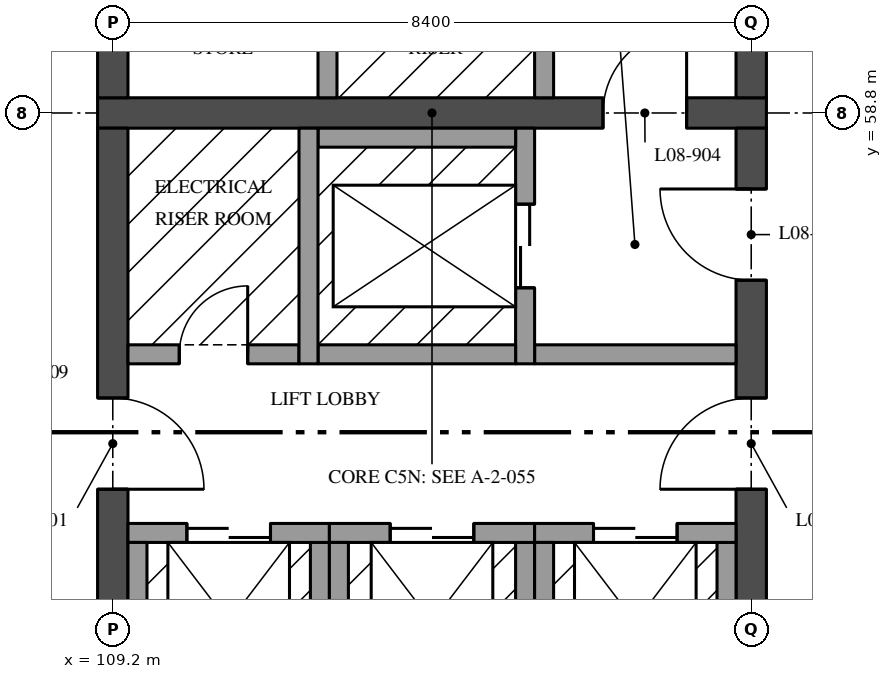
"""IFC4 building model, lengths in metres.
Left out: names, types, materials, properties, quantities, classifications, styles, units other than length and angle.
Written with IfcOpenShell. Run it as: python <this file> out.ifc"""

import sys

from ifc_helpers import new_model, si_unit, direction, frame, frame_2d, origin, place, context, subcontext, project, spatial, rectangle, extrude, element, fill, save


model = new_model("IFC4")
c1 = context("Model", 3, precision=1e-05, world=origin(), true_north=direction((0.0, 1.0)))
c2 = subcontext(c1, "Body", "Model", "MODEL_VIEW")
j1 = project(units=[si_unit("LENGTHUNIT", "METRE"), si_unit("PLANEANGLEUNIT", "RADIAN")], contexts=[c1])
p1 = place(None, origin())
s1 = spatial("IfcSite", under=j1, at=p1, CompositionType="ELEMENT")
p2 = place(p1, origin())
s2 = spatial("IfcBuilding", under=s1, at=p2, CompositionType="ELEMENT")
p3 = place(p2, frame((0.0, 0.0, 36.9)))
s3 = spatial("IfcBuildingStorey", under=s2, at=p3, CompositionType="ELEMENT", Elevation=36.9)
p4 = place(p3, frame((109.0, 58.8, 0.0), z_axis=(0.0, 0.0, 1.0), x_axis=(1.0, 0.0, 0.0)))
e1 = element("IfcWall", 1, at=p4, inside=s3, PredefinedType="SHEAR", context=c2, shape_type="SweptSolid", body=[
    extrude(rectangle(XDim=8.8, YDim=0.4, at=frame_2d((4.4, 0.0))), origin(), (0.0, 0.0, 1.0), 4.37),
])
p5 = place(p4, frame((6.65, 0.0, 0.0)))
e2 = element("IfcOpeningElement", 2, at=p5, cuts=e1, PredefinedType="OPENING", context=c2, shape_type="SweptSolid", body=[
    extrude(rectangle(XDim=1.1, YDim=2.1, at=frame_2d((0.55, 1.05))), frame((0.0, 0.21, 0.0), z_axis=(0.0, -1.0, 0.0), x_axis=(1.0, 0.0, 0.0)), (0.0, 0.0, 1.0), 0.42),
])
p6 = place(p3, frame((109.2, 50.6, 0.0), z_axis=(0.0, 0.0, 1.0), x_axis=(0.0, 1.0, 0.0)))
e3 = element("IfcWall", 3, at=p6, inside=s3, PredefinedType="SHEAR", context=c2, shape_type="SweptSolid", body=[
    extrude(rectangle(XDim=8.0, YDim=0.4, at=frame_2d((4.0, 0.0))), origin(), (0.0, 0.0, 1.0), 4.37),
])
p7 = place(p6, frame((3.25, 0.0, 0.0)))
e4 = element("IfcOpeningElement", 4, at=p7, cuts=e3, PredefinedType="OPENING", context=c2, shape_type="SweptSolid", body=[
    extrude(rectangle(XDim=1.2, YDim=2.1, at=frame_2d((0.6, 1.05))), frame((0.0, 0.21, 0.0), z_axis=(0.0, -1.0, 0.0), x_axis=(1.0, 0.0, 0.0)), (0.0, 0.0, 1.0), 0.42),
])
p8 = place(p3, frame((117.6, 50.6, 0.0), z_axis=(0.0, 0.0, 1.0), x_axis=(0.0, 1.0, 0.0)))
e5 = element("IfcWall", 5, at=p8, inside=s3, PredefinedType="SHEAR", context=c2, shape_type="SweptSolid", body=[
    extrude(rectangle(XDim=8.0, YDim=0.4, at=frame_2d((4.0, 0.0))), origin(), (0.0, 0.0, 1.0), 4.37),
])
p9 = place(p8, frame((3.25, 0.0, 0.0)))
e6 = element("IfcOpeningElement", 6, at=p9, cuts=e5, PredefinedType="OPENING", context=c2, shape_type="SweptSolid", body=[
    extrude(rectangle(XDim=1.2, YDim=2.1, at=frame_2d((0.6, 1.05))), frame((0.0, 0.21, 0.0), z_axis=(0.0, -1.0, 0.0), x_axis=(1.0, 0.0, 0.0)), (0.0, 0.0, 1.0), 0.42),
])
p10 = place(p8, frame((6.0, 0.0, 0.0)))
e7 = element("IfcOpeningElement", 7, at=p10, cuts=e5, PredefinedType="OPENING", context=c2, shape_type="SweptSolid", body=[
    extrude(rectangle(XDim=1.2, YDim=2.1, at=frame_2d((0.6, 1.05))), frame((0.0, 0.21, 0.0), z_axis=(0.0, -1.0, 0.0), x_axis=(1.0, 0.0, 0.0)), (0.0, 0.0, 1.0), 0.42),
])
p11 = place(p3, frame((109.4, 55.625, 0.0), z_axis=(0.0, 0.0, 1.0), x_axis=(1.0, 0.0, 0.0)))
e8 = element("IfcWall", 8, at=p11, inside=s3, PredefinedType="SOLIDWALL", context=c2, shape_type="SweptSolid", body=[
    extrude(rectangle(XDim=2.25, YDim=0.25, at=frame_2d((1.125, 0.0))), origin(), (0.0, 0.0, 1.0), 4.37),
])
p12 = place(p11, frame((0.675, 0.0, 0.0)))
e9 = element("IfcOpeningElement", 9, at=p12, cuts=e8, PredefinedType="OPENING", context=c2, shape_type="SweptSolid", body=[
    extrude(rectangle(XDim=0.9, YDim=2.1, at=frame_2d((0.45, 1.05))), frame((0.0, 0.135, 0.0), z_axis=(0.0, -1.0, 0.0), x_axis=(1.0, 0.0, 0.0)), (0.0, 0.0, 1.0), 0.27),
])
p13 = place(p3, frame((114.75, 55.625, 0.0), z_axis=(0.0, 0.0, 1.0), x_axis=(1.0, 0.0, 0.0)))
e10 = element("IfcWall", 10, at=p13, inside=s3, PredefinedType="SOLIDWALL", context=c2, shape_type="SweptSolid", body=[
    extrude(rectangle(XDim=2.65, YDim=0.25, at=frame_2d((1.325, 0.0))), origin(), (0.0, 0.0, 1.0), 4.37),
])
p14 = place(p3, frame((109.2, 59.0, 0.0), z_axis=(0.0, 0.0, 1.0), x_axis=(0.0, 1.0, 0.0)))
e11 = element("IfcWall", 11, at=p14, inside=s3, PredefinedType="SHEAR", context=c2, shape_type="SweptSolid", body=[
    extrude(rectangle(XDim=8.0, YDim=0.4, at=frame_2d((4.0, 0.0))), origin(), (0.0, 0.0, 1.0), 4.37),
])
p15 = place(p14, frame((2.925, 0.0, 0.0)))
e12 = element("IfcOpeningElement", 12, at=p15, cuts=e11, PredefinedType="OPENING", context=c2, shape_type="SweptSolid", body=[
    extrude(rectangle(XDim=1.2, YDim=2.1, at=frame_2d((0.6, 1.05))), frame((0.0, 0.21, 0.0), z_axis=(0.0, -1.0, 0.0), x_axis=(1.0, 0.0, 0.0)), (0.0, 0.0, 1.0), 0.42),
])
p16 = place(p3, frame((117.6, 59.0, 0.0), z_axis=(0.0, 0.0, 1.0), x_axis=(0.0, 1.0, 0.0)))
e13 = element("IfcWall", 13, at=p16, inside=s3, PredefinedType="SHEAR", context=c2, shape_type="SweptSolid", body=[
    extrude(rectangle(XDim=8.0, YDim=0.4, at=frame_2d((4.0, 0.0))), origin(), (0.0, 0.0, 1.0), 4.37),
])
p17 = place(p16, frame((2.925, 0.0, 0.0)))
e14 = element("IfcOpeningElement", 14, at=p17, cuts=e13, PredefinedType="OPENING", context=c2, shape_type="SweptSolid", body=[
    extrude(rectangle(XDim=1.2, YDim=2.1, at=frame_2d((0.6, 1.05))), frame((0.0, 0.21, 0.0), z_axis=(0.0, -1.0, 0.0), x_axis=(1.0, 0.0, 0.0)), (0.0, 0.0, 1.0), 0.42),
])
p18 = place(p3, frame((114.875, 61.8, 0.0), z_axis=(0.0, 0.0, 1.0), x_axis=(0.0, -1.0, 0.0)))
e15 = element("IfcWall", 15, at=p18, inside=s3, PredefinedType="SOLIDWALL", context=c2, shape_type="SweptSolid", body=[
    extrude(rectangle(XDim=2.8, YDim=0.25, at=frame_2d((1.4, 0.0))), origin(), (0.0, 0.0, 1.0), 4.37),
])
p19 = place(p3, frame((112.025, 61.55, 0.0), z_axis=(0.0, 0.0, 1.0), x_axis=(0.0, -1.0, 0.0)))
e16 = element("IfcWall", 16, at=p19, inside=s3, PredefinedType="SOLIDWALL", context=c2, shape_type="SweptSolid", body=[
    extrude(rectangle(XDim=2.55, YDim=0.25, at=frame_2d((1.275, 0.0))), origin(), (0.0, 0.0, 1.0), 4.37),
])
p20 = place(p3, frame((114.625, 55.5, 0.0), z_axis=(0.0, 0.0, 1.0), x_axis=(0.0, 1.0, 0.0)))
e17 = element("IfcWall", 17, at=p20, inside=s3, PredefinedType="SOLIDWALL", context=c2, shape_type="SweptSolid", body=[
    extrude(rectangle(XDim=3.1, YDim=0.25, at=frame_2d((1.55, 0.0))), origin(), (0.0, 0.0, 1.0), 4.37),
])
p21 = place(p20, frame((1.0, 0.0, 0.0)))
e18 = element("IfcOpeningElement", 18, at=p21, cuts=e17, PredefinedType="OPENING", context=c2, shape_type="SweptSolid", body=[
    extrude(rectangle(XDim=1.1, YDim=2.1, at=frame_2d((0.55, 1.05))), frame((0.0, 0.135, 0.0), z_axis=(0.0, -1.0, 0.0), x_axis=(1.0, 0.0, 0.0)), (0.0, 0.0, 1.0), 0.27),
])
for number, where, z_axis, x_axis in (
    (19, (111.9, 58.475, 0.0), (0.0, 0.0, 1.0), (1.0, 0.0, 0.0)),
    (20, (111.9, 55.625, 0.0), (0.0, 0.0, 1.0), (1.0, 0.0, 0.0)),
):
    element("IfcWall", number, at=place(p3, frame(where, z_axis=z_axis, x_axis=x_axis)), inside=s3, PredefinedType="SOLIDWALL", context=c2, shape_type="SweptSolid", body=[
        extrude(rectangle(XDim=2.6, YDim=0.25, at=frame_2d((1.3, 0.0))), origin(), (0.0, 0.0, 1.0), 4.37),
    ])
p22 = place(p3, frame((111.775, 55.5, 0.0), z_axis=(0.0, 0.0, 1.0), x_axis=(0.0, 1.0, 0.0)))
e21 = element("IfcWall", 21, at=p22, inside=s3, PredefinedType="SOLIDWALL", context=c2, shape_type="SweptSolid", body=[
    extrude(rectangle(XDim=3.1, YDim=0.25, at=frame_2d((1.55, 0.0))), origin(), (0.0, 0.0, 1.0), 4.37),
])
p23 = place(p3, frame((111.925, 50.85, 0.0), z_axis=(0.0, 0.0, 1.0), x_axis=(0.0, 1.0, 0.0)))
e22 = element("IfcWall", 22, at=p23, inside=s3, PredefinedType="SOLIDWALL", context=c2, shape_type="SweptSolid", body=[
    extrude(rectangle(XDim=2.3, YDim=0.25, at=frame_2d((1.15, 0.0))), origin(), (0.0, 0.0, 1.0), 4.37),
])
p24 = place(p3, frame((109.4, 53.275, 0.0), z_axis=(0.0, 0.0, 1.0), x_axis=(1.0, 0.0, 0.0)))
e23 = element("IfcWall", 23, at=p24, inside=s3, PredefinedType="SOLIDWALL", context=c2, shape_type="SweptSolid", body=[
    extrude(rectangle(XDim=2.65, YDim=0.25, at=frame_2d((1.325, 0.0))), origin(), (0.0, 0.0, 1.0), 4.37),
])
p25 = place(p24, frame((0.775, 0.0, 0.0)))
e24 = element("IfcOpeningElement", 24, at=p25, cuts=e23, PredefinedType="OPENING", context=c2, shape_type="SweptSolid", body=[
    extrude(rectangle(XDim=1.1, YDim=2.1, at=frame_2d((0.55, 1.05))), frame((0.0, 0.135, 0.0), z_axis=(0.0, -1.0, 0.0), x_axis=(1.0, 0.0, 0.0)), (0.0, 0.0, 1.0), 0.27),
])
for number, where, z_axis, x_axis in (
    (25, (109.525, 50.85, 0.0), (0.0, 0.0, 1.0), (0.0, 1.0, 0.0)),
    (26, (114.625, 50.85, 0.0), (0.0, 0.0, 1.0), (0.0, 1.0, 0.0)),
):
    element("IfcWall", number, at=place(p3, frame(where, z_axis=z_axis, x_axis=x_axis)), inside=s3, PredefinedType="SOLIDWALL", context=c2, shape_type="SweptSolid", body=[
        extrude(rectangle(XDim=2.3, YDim=0.25, at=frame_2d((1.15, 0.0))), origin(), (0.0, 0.0, 1.0), 4.37),
    ])
p26 = place(p3, frame((112.05, 53.275, 0.0), z_axis=(0.0, 0.0, 1.0), x_axis=(1.0, 0.0, 0.0)))
e27 = element("IfcWall", 27, at=p26, inside=s3, PredefinedType="SOLIDWALL", context=c2, shape_type="SweptSolid", body=[
    extrude(rectangle(XDim=2.7, YDim=0.25, at=frame_2d((1.35, 0.0))), origin(), (0.0, 0.0, 1.0), 4.37),
])
p27 = place(p26, frame((0.8, 0.0, 0.0)))
e28 = element("IfcOpeningElement", 28, at=p27, cuts=e27, PredefinedType="OPENING", context=c2, shape_type="SweptSolid", body=[
    extrude(rectangle(XDim=1.1, YDim=2.1, at=frame_2d((0.55, 1.05))), frame((0.0, 0.135, 0.0), z_axis=(0.0, -1.0, 0.0), x_axis=(1.0, 0.0, 0.0)), (0.0, 0.0, 1.0), 0.27),
])
for number, where, z_axis, x_axis in (
    (29, (112.175, 50.85, 0.0), (0.0, 0.0, 1.0), (0.0, 1.0, 0.0)),
    (30, (117.275, 50.85, 0.0), (0.0, 0.0, 1.0), (0.0, 1.0, 0.0)),
):
    element("IfcWall", number, at=place(p3, frame(where, z_axis=z_axis, x_axis=x_axis)), inside=s3, PredefinedType="SOLIDWALL", context=c2, shape_type="SweptSolid", body=[
        extrude(rectangle(XDim=2.3, YDim=0.25, at=frame_2d((1.15, 0.0))), origin(), (0.0, 0.0, 1.0), 4.37),
    ])
p28 = place(p3, frame((114.75, 53.275, 0.0), z_axis=(0.0, 0.0, 1.0), x_axis=(1.0, 0.0, 0.0)))
e31 = element("IfcWall", 31, at=p28, inside=s3, PredefinedType="SOLIDWALL", context=c2, shape_type="SweptSolid", body=[
    extrude(rectangle(XDim=2.65, YDim=0.25, at=frame_2d((1.325, 0.0))), origin(), (0.0, 0.0, 1.0), 4.37),
])
p29 = place(p28, frame((0.775, 0.0, 0.0)))
e32 = element("IfcOpeningElement", 32, at=p29, cuts=e31, PredefinedType="OPENING", context=c2, shape_type="SweptSolid", body=[
    extrude(rectangle(XDim=1.1, YDim=2.1, at=frame_2d((0.55, 1.05))), frame((0.0, 0.135, 0.0), z_axis=(0.0, -1.0, 0.0), x_axis=(1.0, 0.0, 0.0)), (0.0, 0.0, 1.0), 0.27),
])
p30 = place(p3, frame((114.875, 50.85, 0.0), z_axis=(0.0, 0.0, 1.0), x_axis=(0.0, 1.0, 0.0)))
e33 = element("IfcWall", 33, at=p30, inside=s3, PredefinedType="SOLIDWALL", context=c2, shape_type="SweptSolid", body=[
    extrude(rectangle(XDim=2.3, YDim=0.25, at=frame_2d((1.15, 0.0))), origin(), (0.0, 0.0, 1.0), 4.37),
])
p31 = place(p7, frame((1.2, 0.0, 0.0), z_axis=(0.0, 0.0, 1.0), x_axis=(-1.0, 0.0, 0.0)))
e34 = element("IfcDoor", 34, at=p31, inside=s3, OperationType="SINGLE_SWING_LEFT", PredefinedType="DOOR", context=c2, shape_type="SweptSolid", body=[
    extrude(rectangle(XDim=1.2, YDim=2.1, at=frame_2d((0.6, 1.05))), frame((0.0, 0.035, 0.0), z_axis=(0.0, -1.0, 0.0), x_axis=(1.0, 0.0, 0.0)), (0.0, 0.0, 1.0), 0.07),
])
fill(e4, e34)
p32 = place(p9, origin())
e35 = element("IfcDoor", 35, at=p32, inside=s3, OperationType="SINGLE_SWING_RIGHT", PredefinedType="DOOR", context=c2, shape_type="SweptSolid", body=[
    extrude(rectangle(XDim=1.2, YDim=2.1, at=frame_2d((0.6, 1.05))), frame((0.0, 0.035, 0.0), z_axis=(0.0, -1.0, 0.0), x_axis=(1.0, 0.0, 0.0)), (0.0, 0.0, 1.0), 0.07),
])
fill(e6, e35)
p33 = place(p10, origin())
e36 = element("IfcDoor", 36, at=p33, inside=s3, OperationType="SINGLE_SWING_LEFT", PredefinedType="DOOR", context=c2, shape_type="SweptSolid", body=[
    extrude(rectangle(XDim=1.2, YDim=2.1, at=frame_2d((0.6, 1.05))), frame((0.0, 0.035, 0.0), z_axis=(0.0, -1.0, 0.0), x_axis=(1.0, 0.0, 0.0)), (0.0, 0.0, 1.0), 0.07),
])
fill(e7, e36)
p34 = place(p5, origin())
e37 = element("IfcDoor", 37, at=p34, inside=s3, OperationType="SINGLE_SWING_LEFT", PredefinedType="DOOR", context=c2, shape_type="SweptSolid", body=[
    extrude(rectangle(XDim=1.1, YDim=2.1, at=frame_2d((0.55, 1.05))), frame((0.0, 0.035, 0.0), z_axis=(0.0, -1.0, 0.0), x_axis=(1.0, 0.0, 0.0)), (0.0, 0.0, 1.0), 0.07),
])
fill(e2, e37)
p35 = place(p12, origin())
e38 = element("IfcDoor", 38, at=p35, inside=s3, OperationType="SINGLE_SWING_LEFT", PredefinedType="DOOR", context=c2, shape_type="SweptSolid", body=[
    extrude(rectangle(XDim=0.9, YDim=2.1, at=frame_2d((0.45, 1.05))), frame((0.0, 0.05, 0.0), z_axis=(0.0, -1.0, 0.0), x_axis=(1.0, 0.0, 0.0)), (0.0, 0.0, 1.0), 0.1),
])
fill(e9, e38)
p36 = place(p21, origin())
e39 = element("IfcDoor", 39, at=p36, inside=s3, OperationType="DOUBLE_DOOR_SLIDING", PredefinedType="DOOR", context=c2, shape_type="SweptSolid", body=[
    extrude(rectangle(XDim=1.1, YDim=2.1, at=frame_2d((0.55, 1.05))), frame((0.0, 0.04, 0.0), z_axis=(0.0, -1.0, 0.0), x_axis=(1.0, 0.0, 0.0)), (0.0, 0.0, 1.0), 0.08),
])
fill(e18, e39)
p37 = place(p25, origin())
e40 = element("IfcDoor", 40, at=p37, inside=s3, OperationType="DOUBLE_DOOR_SLIDING", PredefinedType="DOOR", context=c2, shape_type="SweptSolid", body=[
    extrude(rectangle(XDim=1.1, YDim=2.1, at=frame_2d((0.55, 1.05))), frame((0.0, 0.04, 0.0), z_axis=(0.0, -1.0, 0.0), x_axis=(1.0, 0.0, 0.0)), (0.0, 0.0, 1.0), 0.08),
])
fill(e24, e40)
p38 = place(p27, origin())
e41 = element("IfcDoor", 41, at=p38, inside=s3, OperationType="DOUBLE_DOOR_SLIDING", PredefinedType="DOOR", context=c2, shape_type="SweptSolid", body=[
    extrude(rectangle(XDim=1.1, YDim=2.1, at=frame_2d((0.55, 1.05))), frame((0.0, 0.04, 0.0), z_axis=(0.0, -1.0, 0.0), x_axis=(1.0, 0.0, 0.0)), (0.0, 0.0, 1.0), 0.08),
])
fill(e28, e41)
p39 = place(p29, origin())
e42 = element("IfcDoor", 42, at=p39, inside=s3, OperationType="DOUBLE_DOOR_SLIDING", PredefinedType="DOOR", context=c2, shape_type="SweptSolid", body=[
    extrude(rectangle(XDim=1.1, YDim=2.1, at=frame_2d((0.55, 1.05))), frame((0.0, 0.04, 0.0), z_axis=(0.0, -1.0, 0.0), x_axis=(1.0, 0.0, 0.0)), (0.0, 0.0, 1.0), 0.08),
])
fill(e32, e42)
save(model, sys.argv[1])
